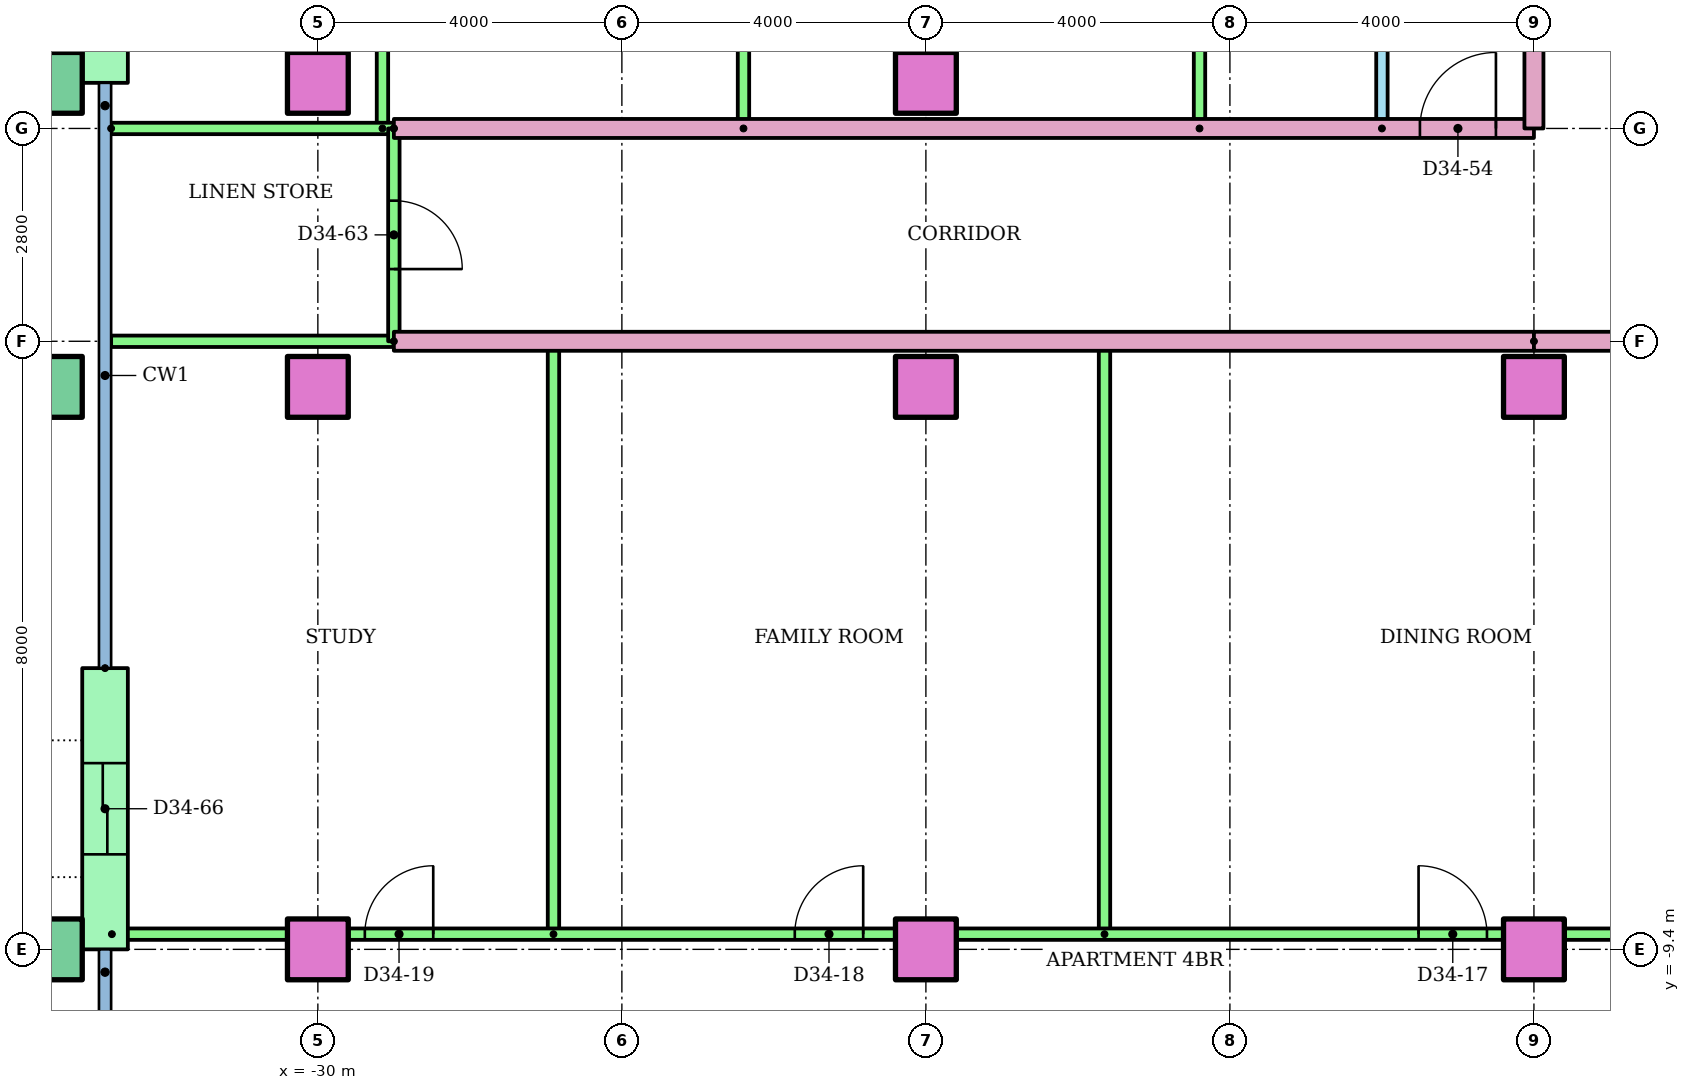
"""IFC4 building model, lengths in metres.
Left out: names, types, materials, properties, quantities, classifications, styles, units other than length and angle.
Written with IfcOpenShell. Run it as: python <this file> out.ifc"""

import sys

from ifc_helpers import new_model, si_unit, direction, frame, frame_2d, origin, origin_2d, place, context, subcontext, project, spatial, rectangle, hollow_rectangle, extrude, element, fill, save


model = new_model("IFC4")
c1 = context("Model", 3, precision=1e-05, world=origin(), true_north=direction((0.0, 1.0)))
c2 = subcontext(c1, "Body", "Model", "MODEL_VIEW")
j1 = project(units=[si_unit("LENGTHUNIT", "METRE"), si_unit("PLANEANGLEUNIT", "RADIAN")], contexts=[c1])
p1 = place(None, origin())
s1 = spatial("IfcSite", under=j1, at=p1, CompositionType="ELEMENT")
p2 = place(p1, origin())
s2 = spatial("IfcBuilding", under=s1, at=p2, CompositionType="ELEMENT")
p3 = place(p2, frame((0.0, 0.0, 132.6)))
s3 = spatial("IfcBuildingStorey", under=s2, at=p3, CompositionType="ELEMENT", Elevation=132.6)
p4 = place(p3, frame((-33.5, -9.4, 0.0)))
e1 = element("IfcColumn", 1, at=p4, inside=s3, PredefinedType="COLUMN", context=c2, shape_type="SweptSolid", body=[
    extrude(hollow_rectangle(XDim=0.8, YDim=0.8, WallThickness=0.04, at=origin_2d()), origin(), (0.0, 0.0, 1.0), 3.2),
])
for number, where in (
    (2, (-30.0, -9.4, 0.0)),
    (3, (-22.0, -9.4, 0.0)),
    (4, (-14.0, -9.4, 0.0)),
):
    element("IfcColumn", number, at=place(p3, frame(where)), inside=s3, PredefinedType="COLUMN", context=c2, shape_type="SweptSolid", body=[
        extrude(rectangle(XDim=0.8, YDim=0.8, at=origin_2d()), origin(), (0.0, 0.0, 1.0), 3.2),
    ])
p5 = place(p3, frame((-33.5, -2.0, 0.0)))
e5 = element("IfcColumn", 5, at=p5, inside=s3, PredefinedType="COLUMN", context=c2, shape_type="SweptSolid", body=[
    extrude(hollow_rectangle(XDim=0.8, YDim=0.8, WallThickness=0.04, at=origin_2d()), origin(), (0.0, 0.0, 1.0), 3.2),
])
for number, where in (
    (6, (-30.0, -2.0, 0.0)),
    (7, (-22.0, -2.0, 0.0)),
    (8, (-14.0, -2.0, 0.0)),
):
    element("IfcColumn", number, at=place(p3, frame(where)), inside=s3, PredefinedType="COLUMN", context=c2, shape_type="SweptSolid", body=[
        extrude(rectangle(XDim=0.8, YDim=0.8, at=origin_2d()), origin(), (0.0, 0.0, 1.0), 3.2),
    ])
p6 = place(p3, frame((-33.5, 2.0, 0.0)))
e9 = element("IfcColumn", 9, at=p6, inside=s3, PredefinedType="COLUMN", context=c2, shape_type="SweptSolid", body=[
    extrude(hollow_rectangle(XDim=0.8, YDim=0.8, WallThickness=0.04, at=origin_2d()), origin(), (0.0, 0.0, 1.0), 3.2),
])
for number, where in (
    (10, (-30.0, 2.0, 0.0)),
    (11, (-22.0, 2.0, 0.0)),
):
    element("IfcColumn", number, at=place(p3, frame(where)), inside=s3, PredefinedType="COLUMN", context=c2, shape_type="SweptSolid", body=[
        extrude(rectangle(XDim=0.8, YDim=0.8, at=origin_2d()), origin(), (0.0, 0.0, 1.0), 3.2),
    ])
p7 = place(p3, frame((-32.8, 6.5, 0.0), z_axis=(0.0, 0.0, 1.0), x_axis=(0.0, -1.0, 0.0)))
e12 = element("IfcWall", 12, at=p7, inside=s3, PredefinedType="STANDARD", context=c2, shape_type="SweptSolid", body=[
    extrude(rectangle(XDim=4.5, YDim=0.6, at=frame_2d((2.25, 0.0))), origin(), (0.0, 0.0, 1.0), 2.92),
])
p8 = place(p7, frame((1.65, 0.0, 0.0)))
e13 = element("IfcOpeningElement", 13, at=p8, cuts=e12, PredefinedType="OPENING", context=c2, shape_type="SweptSolid", body=[
    extrude(rectangle(XDim=1.2, YDim=2.1, at=frame_2d((0.6, 1.05))), frame((0.0, 0.31, 0.0), z_axis=(0.0, -1.0, 0.0), x_axis=(1.0, 0.0, 0.0)), (0.0, 0.0, 1.0), 0.62),
])
p9 = place(p3, frame((-32.8, -5.7, 0.0), z_axis=(0.0, 0.0, 1.0), x_axis=(0.0, -1.0, 0.0)))
e14 = element("IfcWall", 14, at=p9, inside=s3, PredefinedType="STANDARD", context=c2, shape_type="SweptSolid", body=[
    extrude(rectangle(XDim=3.7, YDim=0.6, at=frame_2d((1.85, 0.0))), origin(), (0.0, 0.0, 1.0), 2.92),
])
p10 = place(p9, frame((1.25, 0.0, 0.0)))
e15 = element("IfcOpeningElement", 15, at=p10, cuts=e14, PredefinedType="OPENING", context=c2, shape_type="SweptSolid", body=[
    extrude(rectangle(XDim=1.2, YDim=2.1, at=frame_2d((0.6, 1.05))), frame((0.0, 0.31, 0.0), z_axis=(0.0, -1.0, 0.0), x_axis=(1.0, 0.0, 0.0)), (0.0, 0.0, 1.0), 0.62),
])
for number, where, z_axis, x_axis in (
    (16, (-19.65, -9.2, 0.0), (0.0, 0.0, 1.0), (0.0, 1.0, 0.0)),
    (17, (-26.9, -9.2, 0.0), (0.0, 0.0, 1.0), (0.0, 1.0, 0.0)),
):
    element("IfcWall", number, at=place(p3, frame(where, z_axis=z_axis, x_axis=x_axis)), inside=s3, PredefinedType="PARTITIONING", context=c2, shape_type="SweptSolid", body=[
        extrude(rectangle(XDim=7.8, YDim=0.15, at=frame_2d((3.9, 0.0))), origin(), (0.0, 0.0, 1.0), 2.4),
    ])
p11 = place(p3, frame((-32.71, -9.2, 0.0)))
e18 = element("IfcWall", 18, at=p11, inside=s3, PredefinedType="PARTITIONING", context=c2, shape_type="SweptSolid", body=[
    extrude(rectangle(XDim=24.71, YDim=0.15, at=frame_2d((12.355, 0.0))), origin(), (0.0, 0.0, 1.0), 2.4),
])
p12 = place(p11, frame((17.192, 0.0, 0.0)))
e19 = element("IfcOpeningElement", 19, at=p12, cuts=e18, PredefinedType="OPENING", context=c2, shape_type="SweptSolid", body=[
    extrude(rectangle(XDim=0.9, YDim=2.1, at=frame_2d((0.45, 1.05))), frame((0.0, 0.085, 0.0), z_axis=(0.0, -1.0, 0.0), x_axis=(1.0, 0.0, 0.0)), (0.0, 0.0, 1.0), 0.17),
])
p13 = place(p11, frame((8.985, 0.0, 0.0)))
e20 = element("IfcOpeningElement", 20, at=p13, cuts=e18, PredefinedType="OPENING", context=c2, shape_type="SweptSolid", body=[
    extrude(rectangle(XDim=0.9, YDim=2.1, at=frame_2d((0.45, 1.05))), frame((0.0, 0.085, 0.0), z_axis=(0.0, -1.0, 0.0), x_axis=(1.0, 0.0, 0.0)), (0.0, 0.0, 1.0), 0.17),
])
p14 = place(p11, frame((3.328, 0.0, 0.0)))
e21 = element("IfcOpeningElement", 21, at=p14, cuts=e18, PredefinedType="OPENING", context=c2, shape_type="SweptSolid", body=[
    extrude(rectangle(XDim=0.9, YDim=2.1, at=frame_2d((0.45, 1.05))), frame((0.0, 0.085, 0.0), z_axis=(0.0, -1.0, 0.0), x_axis=(1.0, 0.0, 0.0)), (0.0, 0.0, 1.0), 0.17),
])
p15 = place(p3, frame((-14.0, -1.4, 0.0), z_axis=(0.0, 0.0, 1.0), x_axis=(-1.0, 0.0, 0.0)))
e22 = element("IfcWall", 22, at=p15, inside=s3, PredefinedType="PARTITIONING", context=c2, shape_type="SweptSolid", body=[
    extrude(rectangle(XDim=15.0, YDim=0.25, at=frame_2d((7.5, 0.0))), origin(), (0.0, 0.0, 1.0), 2.4),
])
p16 = place(p3, frame((-29.0, -1.4, 0.0), z_axis=(0.0, 0.0, 1.0), x_axis=(-1.0, 0.0, 0.0)))
e23 = element("IfcWall", 23, at=p16, inside=s3, PredefinedType="PARTITIONING", context=c2, shape_type="SweptSolid", body=[
    extrude(rectangle(XDim=3.72, YDim=0.15, at=frame_2d((1.86, 0.0))), origin(), (0.0, 0.0, 1.0), 2.4),
])
p17 = place(p3, frame((-16.0, 1.4, 0.0), z_axis=(0.0, 0.0, 1.0), x_axis=(0.0, 1.0, 0.0)))
e24 = element("IfcWall", 24, at=p17, inside=s3, PredefinedType="PARTITIONING", context=c2, shape_type="SweptSolid", body=[
    extrude(rectangle(XDim=10.2, YDim=0.15, at=frame_2d((5.1, 0.0))), origin(), (0.0, 0.0, 1.0), 2.4),
])
p18 = place(p17, frame((2.3, 0.0, 0.0)))
e25 = element("IfcOpeningElement", 25, at=p18, cuts=e24, PredefinedType="OPENING", context=c2, shape_type="SweptSolid", body=[
    extrude(rectangle(XDim=0.9, YDim=2.1, at=frame_2d((0.45, 1.05))), frame((0.0, 0.085, 0.0), z_axis=(0.0, -1.0, 0.0), x_axis=(1.0, 0.0, 0.0)), (0.0, 0.0, 1.0), 0.17),
])
p19 = place(p17, frame((7.45, 0.0, 0.0)))
e26 = element("IfcOpeningElement", 26, at=p19, cuts=e24, PredefinedType="OPENING", context=c2, shape_type="SweptSolid", body=[
    extrude(rectangle(XDim=0.8, YDim=2.1, at=frame_2d((0.4, 1.05))), frame((0.0, 0.085, 0.0), z_axis=(0.0, -1.0, 0.0), x_axis=(1.0, 0.0, 0.0)), (0.0, 0.0, 1.0), 0.17),
])
for number, where, z_axis, x_axis in (
    (27, (-18.4, 1.4, 0.0), (0.0, 0.0, 1.0), (0.0, 1.0, 0.0)),
    (28, (-24.4, 1.4, 0.0), (0.0, 0.0, 1.0), (0.0, 1.0, 0.0)),
    (29, (-29.15, 1.4, 0.0), (0.0, 0.0, 1.0), (0.0, 1.0, 0.0)),
):
    element("IfcWall", number, at=place(p3, frame(where, z_axis=z_axis, x_axis=x_axis)), inside=s3, PredefinedType="PARTITIONING", context=c2, shape_type="SweptSolid", body=[
        extrude(rectangle(XDim=10.2, YDim=0.15, at=frame_2d((5.1, 0.0))), origin(), (0.0, 0.0, 1.0), 2.4),
    ])
p20 = place(p3, frame((-29.0, 1.4, 0.0)))
e30 = element("IfcWall", 30, at=p20, inside=s3, PredefinedType="PARTITIONING", context=c2, shape_type="SweptSolid", body=[
    extrude(rectangle(XDim=15.0, YDim=0.25, at=frame_2d((7.5, 0.0))), origin(), (0.0, 0.0, 1.0), 2.4),
])
p21 = place(p20, frame((13.5, 0.0, 0.0)))
e31 = element("IfcOpeningElement", 31, at=p21, cuts=e30, PredefinedType="OPENING", context=c2, shape_type="SweptSolid", body=[
    extrude(rectangle(XDim=1.0, YDim=2.1, at=frame_2d((0.5, 1.05))), frame((0.0, 0.135, 0.0), z_axis=(0.0, -1.0, 0.0), x_axis=(1.0, 0.0, 0.0)), (0.0, 0.0, 1.0), 0.27),
])
p22 = place(p3, frame((-32.72, 1.4, 0.0)))
e32 = element("IfcWall", 32, at=p22, inside=s3, PredefinedType="PARTITIONING", context=c2, shape_type="SweptSolid", body=[
    extrude(rectangle(XDim=3.72, YDim=0.15, at=frame_2d((1.86, 0.0))), origin(), (0.0, 0.0, 1.0), 2.4),
])
p23 = place(p3, frame((-29.0, 1.4, 0.0), z_axis=(0.0, 0.0, 1.0), x_axis=(0.0, -1.0, 0.0)))
e33 = element("IfcWall", 33, at=p23, inside=s3, PredefinedType="PARTITIONING", context=c2, shape_type="SweptSolid", body=[
    extrude(rectangle(XDim=2.8, YDim=0.15, at=frame_2d((1.4, 0.0))), origin(), (0.0, 0.0, 1.0), 2.4),
])
p24 = place(p23, frame((0.95, 0.0, 0.0)))
e34 = element("IfcOpeningElement", 34, at=p24, cuts=e33, PredefinedType="OPENING", context=c2, shape_type="SweptSolid", body=[
    extrude(rectangle(XDim=0.9, YDim=2.1, at=frame_2d((0.45, 1.05))), frame((0.0, 0.085, 0.0), z_axis=(0.0, -1.0, 0.0), x_axis=(1.0, 0.0, 0.0)), (0.0, 0.0, 1.0), 0.17),
])
p25 = place(p3, frame((14.0, -1.4, 0.0), z_axis=(0.0, 0.0, 1.0), x_axis=(-1.0, 0.0, 0.0)))
e35 = element("IfcWall", 35, at=p25, inside=s3, PredefinedType="PARTITIONING", context=c2, shape_type="SweptSolid", body=[
    extrude(rectangle(XDim=28.0, YDim=0.25, at=frame_2d((14.0, 0.0))), origin(), (0.0, 0.0, 1.0), 2.4),
])
p26 = place(p25, frame((20.618, 0.0, 0.0)))
e36 = element("IfcOpeningElement", 36, at=p26, cuts=e35, PredefinedType="OPENING", context=c2, shape_type="SweptSolid", body=[
    extrude(rectangle(XDim=1.0, YDim=2.1, at=frame_2d((0.5, 1.05))), frame((0.0, 0.135, 0.0), z_axis=(0.0, -1.0, 0.0), x_axis=(1.0, 0.0, 0.0)), (0.0, 0.0, 1.0), 0.27),
])
p27 = place(p25, frame((18.382, 0.0, 0.0)))
e37 = element("IfcOpeningElement", 37, at=p27, cuts=e35, PredefinedType="OPENING", context=c2, shape_type="SweptSolid", body=[
    extrude(rectangle(XDim=1.0, YDim=2.1, at=frame_2d((0.5, 1.05))), frame((0.0, 0.135, 0.0), z_axis=(0.0, -1.0, 0.0), x_axis=(1.0, 0.0, 0.0)), (0.0, 0.0, 1.0), 0.27),
])
p28 = place(p25, frame((2.382, 0.0, 0.0)))
e38 = element("IfcOpeningElement", 38, at=p28, cuts=e35, PredefinedType="OPENING", context=c2, shape_type="SweptSolid", body=[
    extrude(rectangle(XDim=1.0, YDim=2.1, at=frame_2d((0.5, 1.05))), frame((0.0, 0.135, 0.0), z_axis=(0.0, -1.0, 0.0), x_axis=(1.0, 0.0, 0.0)), (0.0, 0.0, 1.0), 0.27),
])
p29 = place(p3, frame((-14.0, 3.0, 0.0), z_axis=(0.0, 0.0, 1.0), x_axis=(0.0, -1.0, 0.0)))
e39 = element("IfcWall", 39, at=p29, inside=s3, PredefinedType="PARTITIONING", context=c2, shape_type="SweptSolid", body=[
    extrude(rectangle(XDim=1.6, YDim=0.25, at=frame_2d((0.8, 0.0))), origin(), (0.0, 0.0, 1.0), 2.4),
])
p30 = place(p12, origin())
e40 = element("IfcDoor", 40, at=p30, inside=s3, OperationType="SINGLE_SWING_LEFT", PredefinedType="DOOR", context=c2, shape_type="SweptSolid", body=[
    extrude(rectangle(XDim=0.9, YDim=2.1, at=frame_2d((0.45, 1.05))), frame((0.0, 0.025, 0.0), z_axis=(0.0, -1.0, 0.0), x_axis=(1.0, 0.0, 0.0)), (0.0, 0.0, 1.0), 0.05),
])
fill(e19, e40)
p31 = place(p13, origin())
e41 = element("IfcDoor", 41, at=p31, inside=s3, OperationType="SINGLE_SWING_RIGHT", PredefinedType="DOOR", context=c2, shape_type="SweptSolid", body=[
    extrude(rectangle(XDim=0.9, YDim=2.1, at=frame_2d((0.45, 1.05))), frame((0.0, 0.025, 0.0), z_axis=(0.0, -1.0, 0.0), x_axis=(1.0, 0.0, 0.0)), (0.0, 0.0, 1.0), 0.05),
])
fill(e20, e41)
p32 = place(p14, origin())
e42 = element("IfcDoor", 42, at=p32, inside=s3, OperationType="SINGLE_SWING_RIGHT", PredefinedType="DOOR", context=c2, shape_type="SweptSolid", body=[
    extrude(rectangle(XDim=0.9, YDim=2.1, at=frame_2d((0.45, 1.05))), frame((0.0, 0.025, 0.0), z_axis=(0.0, -1.0, 0.0), x_axis=(1.0, 0.0, 0.0)), (0.0, 0.0, 1.0), 0.05),
])
fill(e21, e42)
p33 = place(p21, origin())
e43 = element("IfcDoor", 43, at=p33, inside=s3, OperationType="SINGLE_SWING_RIGHT", PredefinedType="DOOR", context=c2, shape_type="SweptSolid", body=[
    extrude(rectangle(XDim=1.0, YDim=2.1, at=frame_2d((0.5, 1.05))), frame((0.0, 0.025, 0.0), z_axis=(0.0, -1.0, 0.0), x_axis=(1.0, 0.0, 0.0)), (0.0, 0.0, 1.0), 0.05),
])
fill(e31, e43)
p34 = place(p24, origin())
e44 = element("IfcDoor", 44, at=p34, inside=s3, OperationType="SINGLE_SWING_RIGHT", PredefinedType="DOOR", context=c2, shape_type="SweptSolid", body=[
    extrude(rectangle(XDim=0.9, YDim=2.1, at=frame_2d((0.45, 1.05))), frame((0.0, 0.025, 0.0), z_axis=(0.0, -1.0, 0.0), x_axis=(1.0, 0.0, 0.0)), (0.0, 0.0, 1.0), 0.05),
])
fill(e34, e44)
p35 = place(p10, origin())
e45 = element("IfcDoor", 45, at=p35, inside=s3, OperationType="SLIDING_TO_LEFT", PredefinedType="DOOR", context=c2, shape_type="SweptSolid", body=[
    extrude(rectangle(XDim=1.2, YDim=2.1, at=frame_2d((0.6, 1.05))), frame((0.0, 0.025, 0.0), z_axis=(0.0, -1.0, 0.0), x_axis=(1.0, 0.0, 0.0)), (0.0, 0.0, 1.0), 0.05),
])
fill(e15, e45)
save(model, sys.argv[1])
